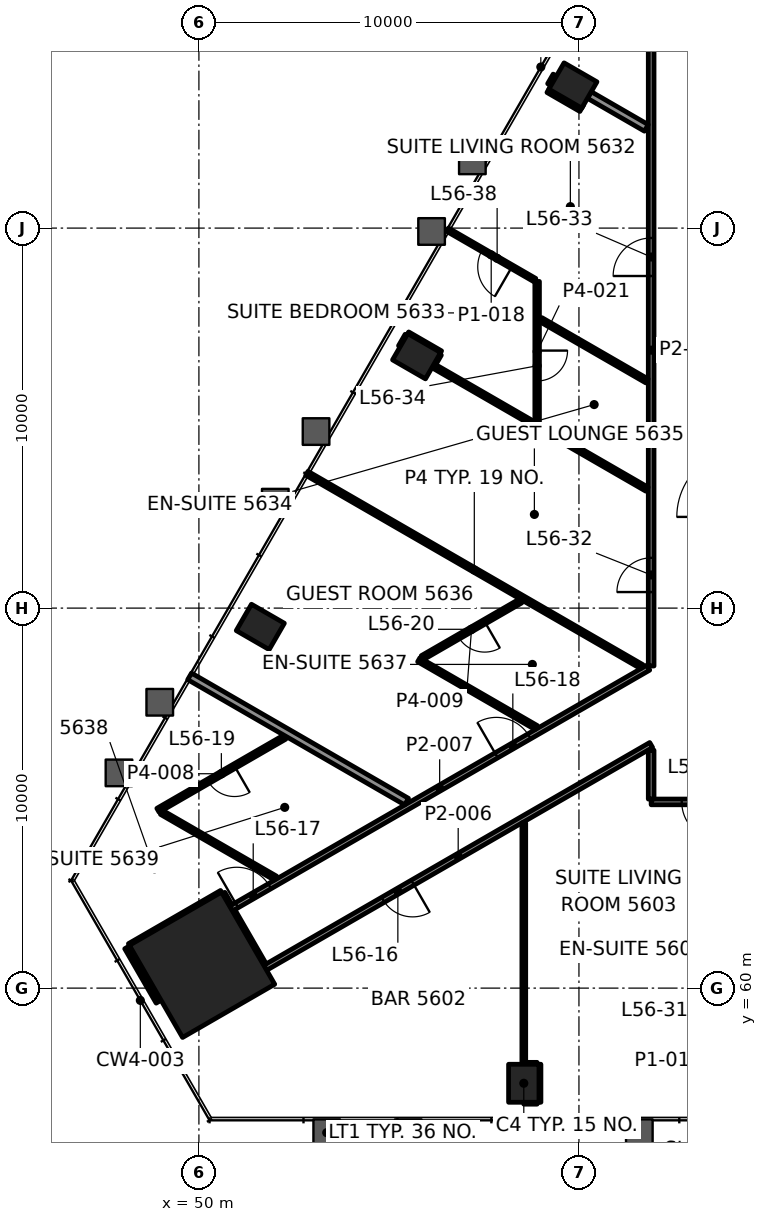
"""IFC4 building model, lengths in metres.
Left out: names, types, materials, properties, quantities, classifications, styles, units other than length and angle.
Written with IfcOpenShell. Run it as: python <this file> out.ifc"""

import sys

from ifc_helpers import new_model, si_unit, direction, frame, frame_2d, origin, origin_2d, place, context, subcontext, project, spatial, rectangle, hollow_rectangle, extrude, element, fill, save


model = new_model("IFC4")
c1 = context("Model", 3, precision=1e-05, world=origin(), true_north=direction((0.0, 1.0)))
c2 = subcontext(c1, "Body", "Model", "MODEL_VIEW")
j1 = project(units=[si_unit("LENGTHUNIT", "METRE"), si_unit("PLANEANGLEUNIT", "RADIAN")], contexts=[c1])
p1 = place(None, origin())
s1 = spatial("IfcSite", under=j1, at=p1, CompositionType="ELEMENT")
p2 = place(p1, origin())
s2 = spatial("IfcBuilding", under=s1, at=p2, CompositionType="ELEMENT")
p3 = place(p2, frame((0.0, 0.0, 237.7)))
s3 = spatial("IfcBuildingStorey", under=s2, at=p3, CompositionType="ELEMENT", Elevation=237.7)
p4 = place(p3, frame((50.082, 60.614, 0.0), z_axis=(0.0, 0.0, 1.0), x_axis=(0.5, -0.866025403784, 0.0)))
e1 = element("IfcColumn", 1, at=p4, inside=s3, PredefinedType="COLUMN", context=c2, shape_type="SweptSolid", body=[
    extrude(rectangle(XDim=2.8, YDim=2.8, at=origin_2d()), origin(), (0.0, 0.0, 1.0), 3.9),
])
for number, where, z_axis, x_axis in (
    (2, (58.549, 57.496, -0.0), (0.0, 0.0, 1.0), (1.0, 0.0, 0.0)),
    (3, (59.841, 83.752, -0.0), (0.0, 0.0, 1.0), (-0.5, -0.866, 0.0)),
    (4, (55.728, 76.628, -0.0), (0.0, 0.0, 1.0), (-0.5, -0.866, 0.0)),
    (5, (51.615, 69.505, -0.0), (0.0, 0.0, 1.0), (-0.5, -0.866, 0.0)),
):
    element("IfcColumn", number, at=place(p3, frame(where, z_axis=z_axis, x_axis=x_axis)), inside=s3, PredefinedType="COLUMN", context=c2, shape_type="SweptSolid", body=[
        extrude(hollow_rectangle(XDim=0.8, YDim=1.0, WallThickness=0.05, at=origin_2d()), origin(), (0.0, 0.0, 1.0), 3.9),
    ])
p5 = place(p3, frame((58.549, 56.996, 0.0), z_axis=(0.0, 0.0, 1.0), x_axis=(1.0, 0.0, 0.0)))
e6 = element("IfcWall", 6, at=p5, inside=s3, PredefinedType="PARTITIONING", context=c2, shape_type="SweptSolid", body=[
    extrude(rectangle(XDim=0.35, YDim=0.1, at=frame_2d((0.175, 0.0))), origin(), (0.0, 0.0, 1.0), 3.0),
])
p6 = place(p3, frame((58.609, 57.996, 0.0), z_axis=(0.0, 0.0, 1.0), x_axis=(1.0, 0.0, 0.0)))
e7 = element("IfcWall", 7, at=p6, inside=s3, PredefinedType="PARTITIONING", context=c2, shape_type="SweptSolid", body=[
    extrude(rectangle(XDim=0.29, YDim=0.1, at=frame_2d((0.145, 0.0))), origin(), (0.0, 0.0, 1.0), 3.0),
])
p7 = place(p3, frame((88.099, 64.9, 0.0), z_axis=(0.0, 0.0, 1.0), x_axis=(-1.0, 0.0, 0.0)))
e8 = element("IfcWall", 8, at=p7, inside=s3, PredefinedType="PARTITIONING", context=c2, shape_type="SweptSolid", body=[
    extrude(rectangle(XDim=26.199, YDim=0.15, at=frame_2d((13.1, 0.0))), origin(), (0.0, 0.0, 1.0), 3.0),
])
p8 = place(p7, frame((2.088, 0.0, 0.0)))
e9 = element("IfcOpeningElement", 9, at=p8, cuts=e8, PredefinedType="OPENING", context=c2, shape_type="SweptSolid", body=[
    extrude(rectangle(XDim=0.9, YDim=2.1, at=frame_2d((0.45, 1.05))), frame((0.0, 0.085, 0.0), z_axis=(0.0, -1.0, 0.0), x_axis=(1.0, 0.0, 0.0)), (0.0, 0.0, 1.0), 0.17),
])
p9 = place(p7, frame((5.4, 0.0, 0.0)))
e10 = element("IfcOpeningElement", 10, at=p9, cuts=e8, PredefinedType="OPENING", context=c2, shape_type="SweptSolid", body=[
    extrude(rectangle(XDim=1.0, YDim=2.1, at=frame_2d((0.5, 1.05))), frame((0.0, 0.085, 0.0), z_axis=(0.0, -1.0, 0.0), x_axis=(1.0, 0.0, 0.0)), (0.0, 0.0, 1.0), 0.17),
])
p10 = place(p7, frame((17.946, 0.0, 0.0)))
e11 = element("IfcOpeningElement", 11, at=p10, cuts=e8, PredefinedType="OPENING", context=c2, shape_type="SweptSolid", body=[
    extrude(rectangle(XDim=1.0, YDim=2.1, at=frame_2d((0.5, 1.05))), frame((0.0, 0.085, 0.0), z_axis=(0.0, -1.0, 0.0), x_axis=(1.0, 0.0, 0.0)), (0.0, 0.0, 1.0), 0.17),
])
p11 = place(p7, frame((24.395, 0.0, 0.0)))
e12 = element("IfcOpeningElement", 12, at=p11, cuts=e8, PredefinedType="OPENING", context=c2, shape_type="SweptSolid", body=[
    extrude(rectangle(XDim=1.0, YDim=2.1, at=frame_2d((0.5, 1.05))), frame((0.0, 0.085, 0.0), z_axis=(0.0, -1.0, 0.0), x_axis=(1.0, 0.0, 0.0)), (0.0, 0.0, 1.0), 0.17),
])
p12 = place(p3, frame((61.9, 66.397, 0.0), z_axis=(0.0, 0.0, 1.0), x_axis=(-0.866028172479, -0.49999520445, 0.0)))
e13 = element("IfcWall", 13, at=p12, inside=s3, PredefinedType="PARTITIONING", context=c2, shape_type="SweptSolid", body=[
    extrude(rectangle(XDim=11.726, YDim=0.15, at=frame_2d((5.863, 0.0))), origin(), (0.0, 0.0, 1.0), 2.847),
])
p13 = place(p12, frame((7.246, 0.0, 0.0)))
e14 = element("IfcOpeningElement", 14, at=p13, cuts=e13, PredefinedType="OPENING", context=c2, shape_type="SweptSolid", body=[
    extrude(rectangle(XDim=0.9, YDim=2.1, at=frame_2d((0.45, 1.05))), frame((0.0, 0.085, 0.0), z_axis=(0.0, -1.0, 0.0), x_axis=(1.0, 0.0, 0.0)), (0.0, 0.0, 1.0), 0.17),
])
p14 = place(p3, frame((50.844, 62.093, 0.0), z_axis=(0.0, 0.0, 1.0), x_axis=(0.866032955338, 0.499986920098, 0.0)))
e15 = element("IfcWall", 15, at=p14, inside=s3, PredefinedType="PARTITIONING", context=c2, shape_type="SweptSolid", body=[
    extrude(rectangle(XDim=12.679, YDim=0.15, at=frame_2d((6.339, 0.0))), origin(), (0.0, 0.0, 1.0), 3.0),
])
p15 = place(p14, frame((0.175, 0.0, 0.0)))
e16 = element("IfcOpeningElement", 16, at=p15, cuts=e15, PredefinedType="OPENING", context=c2, shape_type="SweptSolid", body=[
    extrude(rectangle(XDim=1.0, YDim=2.1, at=frame_2d((0.5, 1.05))), frame((0.0, 0.085, 0.0), z_axis=(0.0, -1.0, 0.0), x_axis=(1.0, 0.0, 0.0)), (0.0, 0.0, 1.0), 0.17),
])
p16 = place(p14, frame((8.063, 0.0, 0.0)))
e17 = element("IfcOpeningElement", 17, at=p16, cuts=e15, PredefinedType="OPENING", context=c2, shape_type="SweptSolid", body=[
    extrude(rectangle(XDim=1.0, YDim=2.1, at=frame_2d((0.5, 1.05))), frame((0.0, 0.085, 0.0), z_axis=(0.0, -1.0, 0.0), x_axis=(1.0, 0.0, 0.0)), (0.0, 0.0, 1.0), 0.17),
])
p17 = place(p3, frame((48.17, 61.126, 0.0), z_axis=(0.0, 0.0, 1.0), x_axis=(0.866034573852, 0.49998411664, 0.0)))
e18 = element("IfcWall", 18, at=p17, inside=s3, PredefinedType="PARTITIONING", context=c2, shape_type="SweptSolid", body=[
    extrude(rectangle(XDim=2.8, YDim=0.1, at=frame_2d((1.4, 0.0))), origin(), (0.0, 0.0, 1.0), 3.0),
])
p18 = place(p3, frame((52.258, 66.604, 0.0), z_axis=(0.0, 0.0, 1.0), x_axis=(-0.86601030197, -0.500026156197, 0.0)))
e19 = element("IfcWall", 19, at=p18, inside=s3, PredefinedType="PARTITIONING", context=c2, shape_type="SweptSolid", body=[
    extrude(rectangle(XDim=3.85, YDim=0.12, at=frame_2d((1.925, 0.0))), origin(), (0.0, 0.0, 1.0), 3.0),
])
p19 = place(p18, frame((1.525, 0.0, 0.0)))
e20 = element("IfcOpeningElement", 20, at=p19, cuts=e19, PredefinedType="OPENING", context=c2, shape_type="SweptSolid", body=[
    extrude(rectangle(XDim=0.8, YDim=2.1, at=frame_2d((0.4, 1.05))), frame((0.0, 0.07, 0.0), z_axis=(0.0, -1.0, 0.0), x_axis=(1.0, 0.0, 0.0)), (0.0, 0.0, 1.0), 0.14),
])
p20 = place(p3, frame((58.467, 70.189, 0.0), z_axis=(0.0, 0.0, 1.0), x_axis=(-0.86604676013, -0.4999630079, 0.0)))
e21 = element("IfcWall", 21, at=p20, inside=s3, PredefinedType="PARTITIONING", context=c2, shape_type="SweptSolid", body=[
    extrude(rectangle(XDim=2.987, YDim=0.12, at=frame_2d((1.494, 0.0))), origin(), (0.0, 0.0, 1.0), 3.0),
])
p21 = place(p20, frame((1.094, 0.0, 0.0)))
e22 = element("IfcOpeningElement", 22, at=p21, cuts=e21, PredefinedType="OPENING", context=c2, shape_type="SweptSolid", body=[
    extrude(rectangle(XDim=0.8, YDim=2.1, at=frame_2d((0.4, 1.05))), frame((0.0, 0.07, 0.0), z_axis=(0.0, -1.0, 0.0), x_axis=(1.0, 0.0, 0.0)), (0.0, 0.0, 1.0), 0.14),
])
p22 = place(p3, frame((56.192, 76.431, 0.0), z_axis=(0.0, 0.0, 1.0), x_axis=(0.500136839105, 0.865946385275, 0.0)))
e23 = element("IfcWall", 23, at=p22, inside=s3, PredefinedType="PARTITIONING", context=c2, shape_type="SweptSolid", body=[
    extrude(rectangle(XDim=0.289, YDim=0.1, at=frame_2d((0.145, 0.0))), origin(), (0.0, 0.0, 1.0), 3.0),
])
p23 = place(p3, frame((55.296, 76.879, 0.0), z_axis=(0.0, 0.0, 1.0), x_axis=(0.500126092966, 0.865952591736, 0.0)))
e24 = element("IfcWall", 24, at=p23, inside=s3, PredefinedType="PARTITIONING", context=c2, shape_type="SweptSolid", body=[
    extrude(rectangle(XDim=0.349, YDim=0.1, at=frame_2d((0.175, 0.0))), origin(), (0.0, 0.0, 1.0), 3.0),
])
p24 = place(p3, frame((59.263, 83.751, 0.0), z_axis=(0.0, 0.0, 1.0), x_axis=(0.499941024108, 0.866059450854, 0.0)))
e25 = element("IfcWall", 25, at=p24, inside=s3, PredefinedType="PARTITIONING", context=c2, shape_type="SweptSolid", body=[
    extrude(rectangle(XDim=0.29, YDim=0.2, at=frame_2d((0.145, 0.0))), origin(), (0.0, 0.0, 1.0), 3.0),
])
p25 = place(p3, frame((61.9, 64.975, 0.0), z_axis=(0.0, 0.0, 1.0), x_axis=(0.0, 1.0, 0.0)))
e26 = element("IfcWall", 26, at=p25, inside=s3, PredefinedType="PARTITIONING", context=c2, shape_type="SweptSolid", body=[
    extrude(rectangle(XDim=1.286, YDim=0.15, at=frame_2d((0.643, 0.0))), origin(), (0.0, 0.0, 1.0), 2.847),
])
p26 = place(p3, frame((61.9, 68.476, 0.0), z_axis=(0.0, 0.0, 1.0), x_axis=(0.0, 1.0, 0.0)))
e27 = element("IfcWall", 27, at=p26, inside=s3, PredefinedType="PARTITIONING", context=c2, shape_type="SweptSolid", body=[
    extrude(rectangle(XDim=16.624, YDim=0.15, at=frame_2d((8.312, 0.0))), origin(), (0.0, 0.0, 1.0), 3.0),
])
p27 = place(p26, frame((1.946, 0.0, 0.0)))
e28 = element("IfcOpeningElement", 28, at=p27, cuts=e27, PredefinedType="OPENING", context=c2, shape_type="SweptSolid", body=[
    extrude(rectangle(XDim=0.9, YDim=2.1, at=frame_2d((0.45, 1.05))), frame((0.0, 0.085, 0.0), z_axis=(0.0, -1.0, 0.0), x_axis=(1.0, 0.0, 0.0)), (0.0, 0.0, 1.0), 0.17),
])
p28 = place(p26, frame((10.263, 0.0, 0.0)))
e29 = element("IfcOpeningElement", 29, at=p28, cuts=e27, PredefinedType="OPENING", context=c2, shape_type="SweptSolid", body=[
    extrude(rectangle(XDim=1.0, YDim=2.1, at=frame_2d((0.5, 1.05))), frame((0.0, 0.085, 0.0), z_axis=(0.0, -1.0, 0.0), x_axis=(1.0, 0.0, 0.0)), (0.0, 0.0, 1.0), 0.17),
])
p29 = place(p3, frame((58.949, 56.996, 0.0), z_axis=(0.0, 0.0, 1.0), x_axis=(0.0, 1.0, 0.0)))
e30 = element("IfcWall", 30, at=p29, inside=s3, PredefinedType="PARTITIONING", context=c2, shape_type="SweptSolid", body=[
    extrude(rectangle(XDim=1.0, YDim=0.1, at=frame_2d((0.5, 0.0))), origin(), (0.0, 0.0, 1.0), 2.922),
])
p30 = place(p3, frame((58.9, 78.596, 0.0), z_axis=(0.0, 0.0, 1.0), x_axis=(0.0, -1.0, 0.0)))
e31 = element("IfcWall", 31, at=p30, inside=s3, PredefinedType="PARTITIONING", context=c2, shape_type="SweptSolid", body=[
    extrude(rectangle(XDim=3.69, YDim=0.12, at=frame_2d((1.845, 0.0))), origin(), (0.0, 0.0, 1.0), 3.0),
])
p31 = place(p30, frame((1.82, 0.0, 0.0)))
e32 = element("IfcOpeningElement", 32, at=p31, cuts=e31, PredefinedType="OPENING", context=c2, shape_type="SweptSolid", body=[
    extrude(rectangle(XDim=0.8, YDim=2.1, at=frame_2d((0.4, 1.05))), frame((0.0, 0.07, 0.0), z_axis=(0.0, -1.0, 0.0), x_axis=(1.0, 0.0, 0.0)), (0.0, 0.0, 1.0), 0.14),
])
p32 = place(p3, frame((58.549, 57.996, 0.0), z_axis=(0.0, 0.0, 1.0), x_axis=(0.0, 1.0, 0.0)))
e33 = element("IfcWall", 33, at=p32, inside=s3, PredefinedType="PARTITIONING", context=c2, shape_type="SweptSolid", body=[
    extrude(rectangle(XDim=6.35, YDim=0.1, at=frame_2d((3.175, 0.0))), origin(), (0.0, 0.0, 1.0), 2.847),
])
p33 = place(p3, frame((51.707, 60.6, 0.0), z_axis=(0.0, 0.0, 1.0), x_axis=(-0.499991515992, 0.866030301974, 0.0)))
e34 = element("IfcWall", 34, at=p33, inside=s3, PredefinedType="PARTITIONING", context=c2, shape_type="SweptSolid", body=[
    extrude(rectangle(XDim=1.649, YDim=0.15, at=frame_2d((0.825, 0.0))), origin(), (0.0, 0.0, 1.0), 2.847),
])
p34 = place(p3, frame((48.918, 59.63, 0.0), z_axis=(0.0, 0.0, 1.0), x_axis=(-0.500029155639, 0.866008570114, 0.0)))
e35 = element("IfcWall", 35, at=p34, inside=s3, PredefinedType="PARTITIONING", context=c2, shape_type="SweptSolid", body=[
    extrude(rectangle(XDim=1.654, YDim=0.1, at=frame_2d((0.827, 0.0))), origin(), (0.0, 0.0, 1.0), 3.0),
])
p35 = place(p3, frame((61.773, 82.637, 0.0), z_axis=(0.0, 0.0, 1.0), x_axis=(-0.866082241464, 0.499901541327, 0.0)))
e36 = element("IfcWall", 36, at=p35, inside=s3, PredefinedType="PARTITIONING", context=c2, shape_type="SweptSolid", body=[
    extrude(rectangle(XDim=1.731, YDim=0.2, at=frame_2d((0.865, 0.0))), origin(), (0.0, 0.0, 1.0), 3.0),
])
p36 = place(p3, frame((60.074, 83.156, 0.0), z_axis=(0.0, 0.0, 1.0), x_axis=(-0.866010750942, 0.50002537861, 0.0)))
e37 = element("IfcWall", 37, at=p36, inside=s3, PredefinedType="PARTITIONING", context=c2, shape_type="SweptSolid", body=[
    extrude(rectangle(XDim=1.0, YDim=0.2, at=frame_2d((0.5, 0.0))), origin(), (0.0, 0.0, 1.0), 2.922),
])
p37 = place(p3, frame((58.84, 78.632, 0.0), z_axis=(0.0, 0.0, 1.0), x_axis=(-0.866049230234, 0.499958729108, 0.0)))
e38 = element("IfcWall", 38, at=p37, inside=s3, PredefinedType="PARTITIONING", context=c2, shape_type="SweptSolid", body=[
    extrude(rectangle(XDim=2.654, YDim=0.1, at=frame_2d((1.327, 0.0))), origin(), (0.0, 0.0, 1.0), 2.922),
])
p38 = place(p37, frame((0.697, 0.0, 0.0)))
e39 = element("IfcOpeningElement", 39, at=p38, cuts=e38, PredefinedType="OPENING", context=c2, shape_type="SweptSolid", body=[
    extrude(rectangle(XDim=0.9, YDim=2.1, at=frame_2d((0.45, 1.05))), frame((0.0, 0.06, 0.0), z_axis=(0.0, -1.0, 0.0), x_axis=(1.0, 0.0, 0.0)), (0.0, 0.0, 1.0), 0.12),
])
p39 = place(p3, frame((61.79, 75.978, 0.0), z_axis=(0.0, 0.0, 1.0), x_axis=(-0.866033195618, 0.499986503906, 0.0)))
e40 = element("IfcWall", 40, at=p39, inside=s3, PredefinedType="PARTITIONING", context=c2, shape_type="SweptSolid", body=[
    extrude(rectangle(XDim=3.228, YDim=0.12, at=frame_2d((1.614, 0.0))), origin(), (0.0, 0.0, 1.0), 3.0),
])
p40 = place(p3, frame((56.361, 76.725, 0.0), z_axis=(0.0, 0.0, 1.0), x_axis=(-0.866039090965, 0.499976292358, 0.0)))
e41 = element("IfcWall", 41, at=p40, inside=s3, PredefinedType="PARTITIONING", context=c2, shape_type="SweptSolid", body=[
    extrude(rectangle(XDim=0.999, YDim=0.1, at=frame_2d((0.5, 0.0))), origin(), (0.0, 0.0, 1.0), 2.922),
])
p41 = place(p3, frame((61.79, 73.128, 0.0), z_axis=(0.0, 0.0, 1.0), x_axis=(-0.866022320763, 0.500005339912, 0.0)))
e42 = element("IfcWall", 42, at=p41, inside=s3, PredefinedType="PARTITIONING", context=c2, shape_type="SweptSolid", body=[
    extrude(rectangle(XDim=6.5, YDim=0.12, at=frame_2d((3.25, 0.0))), origin(), (0.0, 0.0, 1.0), 3.0),
])
p42 = place(p3, frame((61.652, 68.46, 0.0), z_axis=(0.0, 0.0, 1.0), x_axis=(-0.866022556011, 0.500004932455, 0.0)))
e43 = element("IfcWall", 43, at=p42, inside=s3, PredefinedType="PARTITIONING", context=c2, shape_type="SweptSolid", body=[
    extrude(rectangle(XDim=10.175, YDim=0.12, at=frame_2d((5.087, 0.0))), origin(), (0.0, 0.0, 1.0), 2.922),
])
p43 = place(p3, frame((58.876, 66.856, 0.0), z_axis=(0.0, 0.0, 1.0), x_axis=(-0.866028357664, 0.499994883695, 0.0)))
e44 = element("IfcWall", 44, at=p43, inside=s3, PredefinedType="PARTITIONING", context=c2, shape_type="SweptSolid", body=[
    extrude(rectangle(XDim=3.568, YDim=0.12, at=frame_2d((1.784, 0.0))), origin(), (0.0, 0.0, 1.0), 3.0),
])
p44 = place(p3, frame((55.465, 64.907, 0.0), z_axis=(0.0, 0.0, 1.0), x_axis=(-0.866024015056, 0.50000240534, 0.0)))
e45 = element("IfcWall", 45, at=p44, inside=s3, PredefinedType="PARTITIONING", context=c2, shape_type="SweptSolid", body=[
    extrude(rectangle(XDim=6.593, YDim=0.2, at=frame_2d((3.296, 0.0))), origin(), (0.0, 0.0, 1.0), 3.0),
])
p45 = place(p3, frame((52.014, 62.895, 0.0), z_axis=(0.0, 0.0, 1.0), x_axis=(-0.866045730533, 0.499964791386, 0.0)))
e46 = element("IfcWall", 46, at=p45, inside=s3, PredefinedType="PARTITIONING", context=c2, shape_type="SweptSolid", body=[
    extrude(rectangle(XDim=3.459, YDim=0.12, at=frame_2d((1.729, 0.0))), origin(), (0.0, 0.0, 1.0), 3.0),
])
p46 = place(p3, frame((50.807, 62.158, 0.0), z_axis=(0.0, 0.0, 1.0), x_axis=(-0.500060622324, 0.86599040064, 0.0)))
e47 = element("IfcWall", 47, at=p46, inside=s3, PredefinedType="PARTITIONING", context=c2, shape_type="SweptSolid", body=[
    extrude(rectangle(XDim=0.375, YDim=0.15, at=frame_2d((0.188, 0.0))), origin(), (0.0, 0.0, 1.0), 3.0),
])
p47 = place(p11, origin())
e48 = element("IfcDoor", 48, at=p47, inside=s3, OperationType="SINGLE_SWING_LEFT", PredefinedType="DOOR", context=c2, shape_type="SweptSolid", body=[
    extrude(rectangle(XDim=1.0, YDim=2.1, at=frame_2d((0.5, 1.05))), frame((0.0, 0.025, 0.0), z_axis=(0.0, -1.0, 0.0), x_axis=(1.0, 0.0, 0.0)), (0.0, 0.0, 1.0), 0.05),
])
fill(e12, e48)
p48 = place(p13, origin())
e49 = element("IfcDoor", 49, at=p48, inside=s3, OperationType="SINGLE_SWING_RIGHT", PredefinedType="DOOR", context=c2, shape_type="SweptSolid", body=[
    extrude(rectangle(XDim=0.9, YDim=2.1, at=frame_2d((0.45, 1.05))), frame((0.0, 0.025, 0.0), z_axis=(0.0, -1.0, 0.0), x_axis=(1.0, 0.0, 0.0)), (0.0, 0.0, 1.0), 0.05),
])
fill(e14, e49)
p49 = place(p15, origin())
e50 = element("IfcDoor", 50, at=p49, inside=s3, OperationType="SINGLE_SWING_LEFT", PredefinedType="DOOR", context=c2, shape_type="SweptSolid", body=[
    extrude(rectangle(XDim=1.0, YDim=2.1, at=frame_2d((0.5, 1.05))), frame((0.0, 0.025, 0.0), z_axis=(0.0, -1.0, 0.0), x_axis=(1.0, 0.0, 0.0)), (0.0, 0.0, 1.0), 0.05),
])
fill(e16, e50)
p50 = place(p16, origin())
e51 = element("IfcDoor", 51, at=p50, inside=s3, OperationType="SINGLE_SWING_LEFT", PredefinedType="DOOR", context=c2, shape_type="SweptSolid", body=[
    extrude(rectangle(XDim=1.0, YDim=2.1, at=frame_2d((0.5, 1.05))), frame((0.0, 0.025, 0.0), z_axis=(0.0, -1.0, 0.0), x_axis=(1.0, 0.0, 0.0)), (0.0, 0.0, 1.0), 0.05),
])
fill(e17, e51)
p51 = place(p19, origin())
e52 = element("IfcDoor", 52, at=p51, inside=s3, OperationType="SINGLE_SWING_LEFT", PredefinedType="DOOR", context=c2, shape_type="SweptSolid", body=[
    extrude(rectangle(XDim=0.8, YDim=2.1, at=frame_2d((0.4, 1.05))), frame((0.0, 0.025, 0.0), z_axis=(0.0, -1.0, 0.0), x_axis=(1.0, 0.0, 0.0)), (0.0, 0.0, 1.0), 0.05),
])
fill(e20, e52)
p52 = place(p21, origin())
e53 = element("IfcDoor", 53, at=p52, inside=s3, OperationType="SINGLE_SWING_LEFT", PredefinedType="DOOR", context=c2, shape_type="SweptSolid", body=[
    extrude(rectangle(XDim=0.8, YDim=2.1, at=frame_2d((0.4, 1.05))), frame((0.0, 0.025, 0.0), z_axis=(0.0, -1.0, 0.0), x_axis=(1.0, 0.0, 0.0)), (0.0, 0.0, 1.0), 0.05),
])
fill(e22, e53)
p53 = place(p27, origin())
e54 = element("IfcDoor", 54, at=p53, inside=s3, OperationType="SINGLE_SWING_RIGHT", PredefinedType="DOOR", context=c2, shape_type="SweptSolid", body=[
    extrude(rectangle(XDim=0.9, YDim=2.1, at=frame_2d((0.45, 1.05))), frame((0.0, 0.025, 0.0), z_axis=(0.0, -1.0, 0.0), x_axis=(1.0, 0.0, 0.0)), (0.0, 0.0, 1.0), 0.05),
])
fill(e28, e54)
p54 = place(p28, origin())
e55 = element("IfcDoor", 55, at=p54, inside=s3, OperationType="SINGLE_SWING_LEFT", PredefinedType="DOOR", context=c2, shape_type="SweptSolid", body=[
    extrude(rectangle(XDim=1.0, YDim=2.1, at=frame_2d((0.5, 1.05))), frame((0.0, 0.025, 0.0), z_axis=(0.0, -1.0, 0.0), x_axis=(1.0, 0.0, 0.0)), (0.0, 0.0, 1.0), 0.05),
])
fill(e29, e55)
p55 = place(p31, origin())
e56 = element("IfcDoor", 56, at=p55, inside=s3, OperationType="SINGLE_SWING_RIGHT", PredefinedType="DOOR", context=c2, shape_type="SweptSolid", body=[
    extrude(rectangle(XDim=0.8, YDim=2.1, at=frame_2d((0.4, 1.05))), frame((0.0, 0.025, 0.0), z_axis=(0.0, -1.0, 0.0), x_axis=(1.0, 0.0, 0.0)), (0.0, 0.0, 1.0), 0.05),
])
fill(e32, e56)
p56 = place(p38, origin())
e57 = element("IfcDoor", 57, at=p56, inside=s3, OperationType="SINGLE_SWING_RIGHT", PredefinedType="DOOR", context=c2, shape_type="SweptSolid", body=[
    extrude(rectangle(XDim=0.9, YDim=2.1, at=frame_2d((0.45, 1.05))), frame((0.0, 0.025, 0.0), z_axis=(0.0, -1.0, 0.0), x_axis=(1.0, 0.0, 0.0)), (0.0, 0.0, 1.0), 0.05),
])
fill(e39, e57)
save(model, sys.argv[1])
